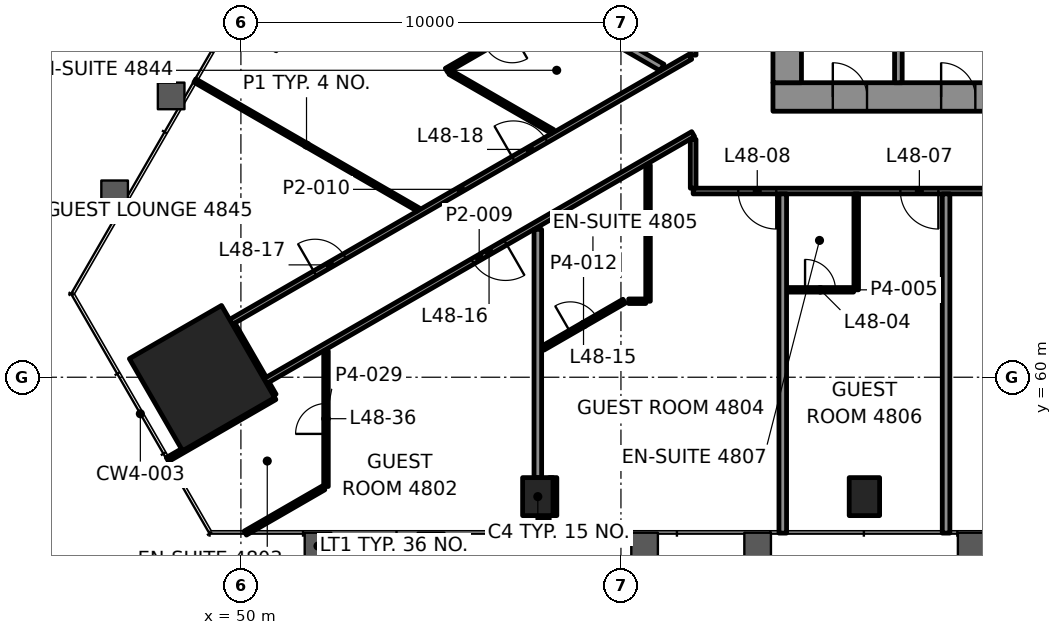
"""IFC4 building model, lengths in metres.
Left out: names, types, materials, properties, quantities, classifications, styles, units other than length and angle.
Written with IfcOpenShell. Run it as: python <this file> out.ifc"""

import sys

from ifc_helpers import new_model, si_unit, direction, frame, frame_2d, origin, origin_2d, place, context, subcontext, project, spatial, rectangle, hollow_rectangle, extrude, element, fill, save


model = new_model("IFC4")
c1 = context("Model", 3, precision=1e-05, world=origin(), true_north=direction((0.0, 1.0)))
c2 = subcontext(c1, "Body", "Model", "MODEL_VIEW")
j1 = project(units=[si_unit("LENGTHUNIT", "METRE"), si_unit("PLANEANGLEUNIT", "RADIAN")], contexts=[c1])
p1 = place(None, origin())
s1 = spatial("IfcSite", under=j1, at=p1, CompositionType="ELEMENT")
p2 = place(p1, origin())
s2 = spatial("IfcBuilding", under=s1, at=p2, CompositionType="ELEMENT")
p3 = place(p2, frame((0.0, 0.0, 206.5)))
s3 = spatial("IfcBuildingStorey", under=s2, at=p3, CompositionType="ELEMENT", Elevation=206.5)
p4 = place(p3, frame((48.978, 59.976, 0.0), z_axis=(0.0, 0.0, 1.0), x_axis=(0.5, -0.866025403784, 0.0)))
e1 = element("IfcColumn", 1, at=p4, inside=s3, PredefinedType="COLUMN", context=c2, shape_type="SweptSolid", body=[
    extrude(rectangle(XDim=2.8, YDim=2.8, at=origin_2d()), origin(), (0.0, 0.0, 1.0), 3.9),
])
for number, where, z_axis, x_axis in (
    (2, (57.812, 56.858, -0.0), (0.0, 0.0, 1.0), (1.0, 0.0, 0.0)),
    (3, (66.406, 56.858, -0.0), (0.0, 0.0, 1.0), (1.0, 0.0, 0.0)),
):
    element("IfcColumn", number, at=place(p3, frame(where, z_axis=z_axis, x_axis=x_axis)), inside=s3, PredefinedType="COLUMN", context=c2, shape_type="SweptSolid", body=[
        extrude(hollow_rectangle(XDim=0.8, YDim=1.0, WallThickness=0.05, at=origin_2d()), origin(), (0.0, 0.0, 1.0), 3.9),
    ])
p5 = place(p3, frame((64.0, 67.375, 0.0), z_axis=(0.0, 0.0, 1.0), x_axis=(1.0, 0.0, 0.0)))
e4 = element("IfcWall", 4, at=p5, inside=s3, PredefinedType="SHEAR", context=c2, shape_type="SweptSolid", body=[
    extrude(rectangle(XDim=22.0, YDim=0.75, at=frame_2d((11.0, 0.0))), origin(), (0.0, 0.0, 1.0), 3.7),
])
p6 = place(p5, frame((1.575, 0.0, 0.0)))
e5 = element("IfcOpeningElement", 5, at=p6, cuts=e4, PredefinedType="OPENING", context=c2, shape_type="SweptSolid", body=[
    extrude(rectangle(XDim=0.9, YDim=2.1, at=frame_2d((0.45, 1.05))), frame((0.0, 0.385, 0.0), z_axis=(0.0, -1.0, 0.0), x_axis=(1.0, 0.0, 0.0)), (0.0, 0.0, 1.0), 0.77),
])
p7 = place(p5, frame((4.425, 0.0, 0.0)))
e6 = element("IfcOpeningElement", 6, at=p7, cuts=e4, PredefinedType="OPENING", context=c2, shape_type="SweptSolid", body=[
    extrude(rectangle(XDim=0.9, YDim=2.1, at=frame_2d((0.45, 1.05))), frame((0.0, 0.385, 0.0), z_axis=(0.0, -1.0, 0.0), x_axis=(1.0, 0.0, 0.0)), (0.0, 0.0, 1.0), 0.77),
])
p8 = place(p3, frame((64.375, 67.75, 0.0), z_axis=(0.0, 0.0, 1.0), x_axis=(0.0, 1.0, 0.0)))
e7 = element("IfcWall", 7, at=p8, inside=s3, PredefinedType="SHEAR", context=c2, shape_type="SweptSolid", body=[
    extrude(rectangle(XDim=14.5, YDim=0.75, at=frame_2d((7.25, 0.0))), origin(), (0.0, 0.0, 1.0), 3.7),
])
p9 = place(p8, frame((4.65, 0.0, 0.0)))
e8 = element("IfcOpeningElement", 8, at=p9, cuts=e7, PredefinedType="OPENING", context=c2, shape_type="SweptSolid", body=[
    extrude(rectangle(XDim=1.8, YDim=2.1, at=frame_2d((0.9, 1.05))), frame((0.0, 0.385, 0.0), z_axis=(0.0, -1.0, 0.0), x_axis=(1.0, 0.0, 0.0)), (0.0, 0.0, 1.0), 0.77),
])
p10 = place(p8, frame((2.55, 0.0, 0.0)))
e9 = element("IfcOpeningElement", 9, at=p10, cuts=e7, PredefinedType="OPENING", context=c2, shape_type="SweptSolid", body=[
    extrude(rectangle(XDim=0.9, YDim=2.1, at=frame_2d((0.45, 1.05))), frame((0.0, 0.385, 0.0), z_axis=(0.0, -1.0, 0.0), x_axis=(1.0, 0.0, 0.0)), (0.0, 0.0, 1.0), 0.77),
])
p11 = place(p8, frame((10.35, 0.0, 0.0)))
e10 = element("IfcOpeningElement", 10, at=p11, cuts=e7, PredefinedType="OPENING", context=c2, shape_type="SweptSolid", body=[
    extrude(rectangle(XDim=0.9, YDim=2.1, at=frame_2d((0.45, 1.05))), frame((0.0, 0.385, 0.0), z_axis=(0.0, -1.0, 0.0), x_axis=(1.0, 0.0, 0.0)), (0.0, 0.0, 1.0), 0.77),
])
p12 = place(p3, frame((57.812, 56.358, 0.0), z_axis=(0.0, 0.0, 1.0), x_axis=(1.0, 0.0, 0.0)))
e11 = element("IfcWall", 11, at=p12, inside=s3, PredefinedType="PARTITIONING", context=c2, shape_type="SweptSolid", body=[
    extrude(rectangle(XDim=0.3, YDim=0.2, at=frame_2d((0.15, 0.0))), origin(), (0.0, 0.0, 1.0), 3.1),
])
p13 = place(p3, frame((60.203, 62.0, 0.0), z_axis=(0.0, 0.0, 1.0), x_axis=(1.0, 0.0, 0.0)))
e12 = element("IfcWall", 12, at=p13, inside=s3, PredefinedType="PARTITIONING", context=c2, shape_type="SweptSolid", body=[
    extrude(rectangle(XDim=0.449, YDim=0.12, at=frame_2d((0.225, 0.0))), origin(), (0.0, 0.0, 1.0), 3.1),
])
p14 = place(p3, frame((64.368, 62.3, 0.0), z_axis=(0.0, 0.0, 1.0), x_axis=(1.0, 0.0, 0.0)))
e13 = element("IfcWall", 13, at=p14, inside=s3, PredefinedType="PARTITIONING", context=c2, shape_type="SweptSolid", body=[
    extrude(rectangle(XDim=1.753, YDim=0.12, at=frame_2d((0.877, 0.0))), origin(), (0.0, 0.0, 1.0), 3.1),
])
p15 = place(p14, frame((0.477, 0.0, 0.0)))
e14 = element("IfcOpeningElement", 14, at=p15, cuts=e13, PredefinedType="OPENING", context=c2, shape_type="SweptSolid", body=[
    extrude(rectangle(XDim=0.8, YDim=2.1, at=frame_2d((0.4, 1.05))), frame((0.0, 0.07, 0.0), z_axis=(0.0, -1.0, 0.0), x_axis=(1.0, 0.0, 0.0)), (0.0, 0.0, 1.0), 0.14),
])
p16 = place(p3, frame((88.1, 64.9, 0.0), z_axis=(0.0, 0.0, 1.0), x_axis=(-1.0, 0.0, 0.0)))
e15 = element("IfcWall", 15, at=p16, inside=s3, PredefinedType="PARTITIONING", context=c2, shape_type="SweptSolid", body=[
    extrude(rectangle(XDim=26.2, YDim=0.15, at=frame_2d((13.1, 0.0))), origin(), (0.0, 0.0, 1.0), 3.1),
])
p17 = place(p16, frame((7.443, 0.0, 0.0)))
e16 = element("IfcOpeningElement", 16, at=p17, cuts=e15, PredefinedType="OPENING", context=c2, shape_type="SweptSolid", body=[
    extrude(rectangle(XDim=1.0, YDim=2.1, at=frame_2d((0.5, 1.05))), frame((0.0, 0.085, 0.0), z_axis=(0.0, -1.0, 0.0), x_axis=(1.0, 0.0, 0.0)), (0.0, 0.0, 1.0), 0.17),
])
p18 = place(p16, frame((16.037, 0.0, 0.0)))
e17 = element("IfcOpeningElement", 17, at=p18, cuts=e15, PredefinedType="OPENING", context=c2, shape_type="SweptSolid", body=[
    extrude(rectangle(XDim=1.0, YDim=2.1, at=frame_2d((0.5, 1.05))), frame((0.0, 0.085, 0.0), z_axis=(0.0, -1.0, 0.0), x_axis=(1.0, 0.0, 0.0)), (0.0, 0.0, 1.0), 0.17),
])
p19 = place(p16, frame((19.747, 0.0, 0.0)))
e18 = element("IfcOpeningElement", 18, at=p19, cuts=e15, PredefinedType="OPENING", context=c2, shape_type="SweptSolid", body=[
    extrude(rectangle(XDim=1.0, YDim=2.1, at=frame_2d((0.5, 1.05))), frame((0.0, 0.085, 0.0), z_axis=(0.0, -1.0, 0.0), x_axis=(1.0, 0.0, 0.0)), (0.0, 0.0, 1.0), 0.17),
])
p20 = place(p16, frame((24.013, 0.0, 0.0)))
e19 = element("IfcOpeningElement", 19, at=p20, cuts=e15, PredefinedType="OPENING", context=c2, shape_type="SweptSolid", body=[
    extrude(rectangle(XDim=1.0, YDim=2.1, at=frame_2d((0.5, 1.05))), frame((0.0, 0.085, 0.0), z_axis=(0.0, -1.0, 0.0), x_axis=(1.0, 0.0, 0.0)), (0.0, 0.0, 1.0), 0.17),
])
p21 = place(p3, frame((50.115, 55.898, 0.0), z_axis=(0.0, 0.0, 1.0), x_axis=(0.865977459579, 0.500083032607, 0.0)))
e20 = element("IfcWall", 20, at=p21, inside=s3, PredefinedType="PARTITIONING", context=c2, shape_type="SweptSolid", body=[
    extrude(rectangle(XDim=2.383, YDim=0.12, at=frame_2d((1.192, 0.0))), origin(), (0.0, 0.0, 1.0), 3.1),
])
p22 = place(p3, frame((57.947, 60.767, 0.0), z_axis=(0.0, 0.0, 1.0), x_axis=(0.866060325455, 0.499939509014, 0.0)))
e21 = element("IfcWall", 21, at=p22, inside=s3, PredefinedType="PARTITIONING", context=c2, shape_type="SweptSolid", body=[
    extrude(rectangle(XDim=2.467, YDim=0.12, at=frame_2d((1.233, 0.0))), origin(), (0.0, 0.0, 1.0), 3.1),
])
p23 = place(p22, frame((0.833, 0.0, 0.0)))
e22 = element("IfcOpeningElement", 22, at=p23, cuts=e21, PredefinedType="OPENING", context=c2, shape_type="SweptSolid", body=[
    extrude(rectangle(XDim=0.8, YDim=2.1, at=frame_2d((0.4, 1.05))), frame((0.0, 0.07, 0.0), z_axis=(0.0, -1.0, 0.0), x_axis=(1.0, 0.0, 0.0)), (0.0, 0.0, 1.0), 0.14),
])
p24 = place(p3, frame((48.067, 57.834, 0.0), z_axis=(0.0, 0.0, 1.0), x_axis=(0.866035906198, 0.499981808845, 0.0)))
e23 = element("IfcWall", 23, at=p24, inside=s3, PredefinedType="PARTITIONING", context=c2, shape_type="SweptSolid", body=[
    extrude(rectangle(XDim=3.259, YDim=0.12, at=frame_2d((1.63, 0.0))), origin(), (0.0, 0.0, 1.0), 3.1),
])
p25 = place(p3, frame((61.9, 66.397, 0.0), z_axis=(0.0, 0.0, 1.0), x_axis=(-0.866028610752, -0.499994445327, 0.0)))
e24 = element("IfcWall", 24, at=p25, inside=s3, PredefinedType="PARTITIONING", context=c2, shape_type="SweptSolid", body=[
    extrude(rectangle(XDim=13.002, YDim=0.15, at=frame_2d((6.501, 0.0))), origin(), (0.0, 0.0, 1.0), 2.947),
])
p26 = place(p25, frame((5.701, 0.0, 0.0)))
e25 = element("IfcOpeningElement", 25, at=p26, cuts=e24, PredefinedType="OPENING", context=c2, shape_type="SweptSolid", body=[
    extrude(rectangle(XDim=1.0, YDim=2.1, at=frame_2d((0.5, 1.05))), frame((0.0, 0.085, 0.0), z_axis=(0.0, -1.0, 0.0), x_axis=(1.0, 0.0, 0.0)), (0.0, 0.0, 1.0), 0.17),
])
p27 = place(p3, frame((49.74, 61.456, 0.0), z_axis=(0.0, 0.0, 1.0), x_axis=(0.866030582951, 0.499991029314, 0.0)))
e26 = element("IfcWall", 26, at=p27, inside=s3, PredefinedType="PARTITIONING", context=c2, shape_type="SweptSolid", body=[
    extrude(rectangle(XDim=13.954, YDim=0.15, at=frame_2d((6.977, 0.0))), origin(), (0.0, 0.0, 1.0), 3.1),
])
p28 = place(p27, frame((2.552, 0.0, 0.0)))
e27 = element("IfcOpeningElement", 27, at=p28, cuts=e26, PredefinedType="OPENING", context=c2, shape_type="SweptSolid", body=[
    extrude(rectangle(XDim=0.9, YDim=2.1, at=frame_2d((0.45, 1.05))), frame((0.0, 0.085, 0.0), z_axis=(0.0, -1.0, 0.0), x_axis=(1.0, 0.0, 0.0)), (0.0, 0.0, 1.0), 0.17),
])
p29 = place(p27, frame((8.579, 0.0, 0.0)))
e28 = element("IfcOpeningElement", 28, at=p29, cuts=e26, PredefinedType="OPENING", context=c2, shape_type="SweptSolid", body=[
    extrude(rectangle(XDim=1.0, YDim=2.1, at=frame_2d((0.5, 1.05))), frame((0.0, 0.085, 0.0), z_axis=(0.0, -1.0, 0.0), x_axis=(1.0, 0.0, 0.0)), (0.0, 0.0, 1.0), 0.17),
])
p30 = place(p3, frame((58.175, 69.674, 0.0), z_axis=(0.0, 0.0, 1.0), x_axis=(-0.866051923801, -0.49995406317, 0.0)))
e29 = element("IfcWall", 29, at=p30, inside=s3, PredefinedType="PARTITIONING", context=c2, shape_type="SweptSolid", body=[
    extrude(rectangle(XDim=3.194, YDim=0.12, at=frame_2d((1.597, 0.0))), origin(), (0.0, 0.0, 1.0), 3.1),
])
p31 = place(p30, frame((1.197, 0.0, 0.0)))
e30 = element("IfcOpeningElement", 30, at=p31, cuts=e29, PredefinedType="OPENING", context=c2, shape_type="SweptSolid", body=[
    extrude(rectangle(XDim=0.8, YDim=2.1, at=frame_2d((0.4, 1.05))), frame((0.0, 0.07, 0.0), z_axis=(0.0, -1.0, 0.0), x_axis=(1.0, 0.0, 0.0)), (0.0, 0.0, 1.0), 0.14),
])
p32 = place(p3, frame((68.555, 55.898, 0.0), z_axis=(0.0, 0.0, 1.0), x_axis=(0.0, 1.0, 0.0)))
e31 = element("IfcWall", 31, at=p32, inside=s3, PredefinedType="PARTITIONING", context=c2, shape_type="SweptSolid", body=[
    extrude(rectangle(XDim=8.927, YDim=0.2, at=frame_2d((4.463, 0.0))), origin(), (0.0, 0.0, 1.0), 3.022),
])
p33 = place(p3, frame((66.191, 62.3, 0.0), z_axis=(0.0, 0.0, 1.0), x_axis=(0.0, 1.0, 0.0)))
e32 = element("IfcWall", 32, at=p33, inside=s3, PredefinedType="PARTITIONING", context=c2, shape_type="SweptSolid", body=[
    extrude(rectangle(XDim=2.525, YDim=0.12, at=frame_2d((1.262, 0.0))), origin(), (0.0, 0.0, 1.0), 3.1),
])
p34 = place(p3, frame((64.258, 55.898, 0.0), z_axis=(0.0, 0.0, 1.0), x_axis=(0.0, 1.0, 0.0)))
e33 = element("IfcWall", 33, at=p34, inside=s3, PredefinedType="PARTITIONING", context=c2, shape_type="SweptSolid", body=[
    extrude(rectangle(XDim=8.927, YDim=0.2, at=frame_2d((4.463, 0.0))), origin(), (0.0, 0.0, 1.0), 3.022),
])
p35 = place(p3, frame((61.9, 64.975, 0.0), z_axis=(0.0, 0.0, 1.0), x_axis=(0.0, 1.0, 0.0)))
e34 = element("IfcWall", 34, at=p35, inside=s3, PredefinedType="PARTITIONING", context=c2, shape_type="SweptSolid", body=[
    extrude(rectangle(XDim=1.286, YDim=0.15, at=frame_2d((0.643, 0.0))), origin(), (0.0, 0.0, 1.0), 2.947),
])
p36 = place(p3, frame((61.9, 68.476, 0.0), z_axis=(0.0, 0.0, 1.0), x_axis=(0.0, 1.0, 0.0)))
e35 = element("IfcWall", 35, at=p36, inside=s3, PredefinedType="PARTITIONING", context=c2, shape_type="SweptSolid", body=[
    extrude(rectangle(XDim=16.624, YDim=0.15, at=frame_2d((8.312, 0.0))), origin(), (0.0, 0.0, 1.0), 3.1),
])
p37 = place(p36, frame((1.984, 0.0, 0.0)))
e36 = element("IfcOpeningElement", 36, at=p37, cuts=e35, PredefinedType="OPENING", context=c2, shape_type="SweptSolid", body=[
    extrude(rectangle(XDim=1.0, YDim=2.1, at=frame_2d((0.5, 1.05))), frame((0.0, 0.085, 0.0), z_axis=(0.0, -1.0, 0.0), x_axis=(1.0, 0.0, 0.0)), (0.0, 0.0, 1.0), 0.17),
])
p38 = place(p36, frame((10.437, 0.0, 0.0)))
e37 = element("IfcOpeningElement", 37, at=p38, cuts=e35, PredefinedType="OPENING", context=c2, shape_type="SweptSolid", body=[
    extrude(rectangle(XDim=1.0, YDim=2.1, at=frame_2d((0.5, 1.05))), frame((0.0, 0.085, 0.0), z_axis=(0.0, -1.0, 0.0), x_axis=(1.0, 0.0, 0.0)), (0.0, 0.0, 1.0), 0.17),
])
p39 = place(p3, frame((60.713, 62.0, 0.0), z_axis=(0.0, 0.0, 1.0), x_axis=(0.0, 1.0, 0.0)))
e38 = element("IfcWall", 38, at=p39, inside=s3, PredefinedType="PARTITIONING", context=c2, shape_type="SweptSolid", body=[
    extrude(rectangle(XDim=3.585, YDim=0.12, at=frame_2d((1.793, 0.0))), origin(), (0.0, 0.0, 1.0), 2.947),
])
p40 = place(p3, frame((58.213, 56.358, 0.0), z_axis=(0.0, 0.0, 1.0), x_axis=(0.0, 1.0, 0.0)))
e39 = element("IfcWall", 39, at=p40, inside=s3, PredefinedType="PARTITIONING", context=c2, shape_type="SweptSolid", body=[
    extrude(rectangle(XDim=1.0, YDim=0.2, at=frame_2d((0.5, 0.0))), origin(), (0.0, 0.0, 1.0), 3.022),
])
p41 = place(p3, frame((57.813, 57.358, 0.0), z_axis=(0.0, 0.0, 1.0), x_axis=(0.0, 1.0, 0.0)))
e40 = element("IfcWall", 40, at=p41, inside=s3, PredefinedType="PARTITIONING", context=c2, shape_type="SweptSolid", body=[
    extrude(rectangle(XDim=6.532, YDim=0.2, at=frame_2d((3.266, 0.0))), origin(), (0.0, 0.0, 1.0), 3.1),
])
p42 = place(p3, frame((52.239, 57.125, 0.0), z_axis=(0.0, 0.0, 1.0), x_axis=(0.0, 1.0, 0.0)))
e41 = element("IfcWall", 41, at=p42, inside=s3, PredefinedType="PARTITIONING", context=c2, shape_type="SweptSolid", body=[
    extrude(rectangle(XDim=3.569, YDim=0.12, at=frame_2d((1.784, 0.0))), origin(), (0.0, 0.0, 1.0), 3.1),
])
p43 = place(p42, frame((1.384, 0.0, 0.0)))
e42 = element("IfcOpeningElement", 42, at=p43, cuts=e41, PredefinedType="OPENING", context=c2, shape_type="SweptSolid", body=[
    extrude(rectangle(XDim=0.8, YDim=2.1, at=frame_2d((0.4, 1.05))), frame((0.0, 0.07, 0.0), z_axis=(0.0, -1.0, 0.0), x_axis=(1.0, 0.0, 0.0)), (0.0, 0.0, 1.0), 0.14),
])
p44 = place(p3, frame((50.86, 59.516, 0.0), z_axis=(0.0, 0.0, 1.0), x_axis=(-0.499741784413, 0.866174433305, 0.0)))
e43 = element("IfcWall", 43, at=p44, inside=s3, PredefinedType="PARTITIONING", context=c2, shape_type="SweptSolid", body=[
    extrude(rectangle(XDim=0.365, YDim=0.15, at=frame_2d((0.182, 0.0))), origin(), (0.0, 0.0, 1.0), 3.1),
])
p45 = place(p3, frame((61.082, 68.15, 0.0), z_axis=(0.0, 0.0, 1.0), x_axis=(-0.866022549299, 0.50000494408, 0.0)))
e44 = element("IfcWall", 44, at=p45, inside=s3, PredefinedType="PARTITIONING", context=c2, shape_type="SweptSolid", body=[
    extrude(rectangle(XDim=10.474, YDim=0.2, at=frame_2d((5.237, 0.0))), origin(), (0.0, 0.0, 1.0), 3.022),
])
p46 = place(p3, frame((58.199, 66.466, 0.0), z_axis=(0.0, 0.0, 1.0), x_axis=(-0.866028856698, 0.499994019331, 0.0)))
e45 = element("IfcWall", 45, at=p46, inside=s3, PredefinedType="PARTITIONING", context=c2, shape_type="SweptSolid", body=[
    extrude(rectangle(XDim=3.113, YDim=0.12, at=frame_2d((1.556, 0.0))), origin(), (0.0, 0.0, 1.0), 3.1),
])
p47 = place(p3, frame((54.663, 64.414, 0.0), z_axis=(0.0, 0.0, 1.0), x_axis=(-0.866023732449, 0.500002894826, 0.0)))
e46 = element("IfcWall", 46, at=p47, inside=s3, PredefinedType="PARTITIONING", context=c2, shape_type="SweptSolid", body=[
    extrude(rectangle(XDim=6.782, YDim=0.1, at=frame_2d((3.391, 0.0))), origin(), (0.0, 0.0, 1.0), 3.1),
])
p48 = place(p3, frame((50.603, 59.962, 0.0), z_axis=(0.0, 0.0, 1.0), x_axis=(-0.499991515992, 0.866030301974, 0.0)))
e47 = element("IfcWall", 47, at=p48, inside=s3, PredefinedType="PARTITIONING", context=c2, shape_type="SweptSolid", body=[
    extrude(rectangle(XDim=1.649, YDim=0.15, at=frame_2d((0.825, 0.0))), origin(), (0.0, 0.0, 1.0), 2.947),
])
p49 = place(p3, frame((67.3, 67.75, 0.0), z_axis=(0.0, 0.0, 1.0), x_axis=(0.0, 1.0, 0.0)))
e48 = element("IfcWall", 48, at=p49, inside=s3, PredefinedType="PARTITIONING", context=c2, shape_type="SweptSolid", body=[
    extrude(rectangle(XDim=3.9, YDim=0.2, at=frame_2d((1.95, 0.0))), origin(), (0.0, 0.0, 1.0), 3.7),
])
p50 = place(p15, origin())
e49 = element("IfcDoor", 49, at=p50, inside=s3, OperationType="SINGLE_SWING_RIGHT", PredefinedType="DOOR", context=c2, shape_type="SweptSolid", body=[
    extrude(rectangle(XDim=0.8, YDim=2.1, at=frame_2d((0.4, 1.05))), frame((0.0, 0.025, 0.0), z_axis=(0.0, -1.0, 0.0), x_axis=(1.0, 0.0, 0.0)), (0.0, 0.0, 1.0), 0.05),
])
fill(e14, e49)
p51 = place(p19, origin())
e50 = element("IfcDoor", 50, at=p51, inside=s3, OperationType="SINGLE_SWING_RIGHT", PredefinedType="DOOR", context=c2, shape_type="SweptSolid", body=[
    extrude(rectangle(XDim=1.0, YDim=2.1, at=frame_2d((0.5, 1.05))), frame((0.0, 0.025, 0.0), z_axis=(0.0, -1.0, 0.0), x_axis=(1.0, 0.0, 0.0)), (0.0, 0.0, 1.0), 0.05),
])
fill(e18, e50)
p52 = place(p20, origin())
e51 = element("IfcDoor", 51, at=p52, inside=s3, OperationType="SINGLE_SWING_RIGHT", PredefinedType="DOOR", context=c2, shape_type="SweptSolid", body=[
    extrude(rectangle(XDim=1.0, YDim=2.1, at=frame_2d((0.5, 1.05))), frame((0.0, 0.025, 0.0), z_axis=(0.0, -1.0, 0.0), x_axis=(1.0, 0.0, 0.0)), (0.0, 0.0, 1.0), 0.05),
])
fill(e19, e51)
p53 = place(p23, origin())
e52 = element("IfcDoor", 52, at=p53, inside=s3, OperationType="SINGLE_SWING_RIGHT", PredefinedType="DOOR", context=c2, shape_type="SweptSolid", body=[
    extrude(rectangle(XDim=0.8, YDim=2.1, at=frame_2d((0.4, 1.05))), frame((0.0, 0.025, 0.0), z_axis=(0.0, -1.0, 0.0), x_axis=(1.0, 0.0, 0.0)), (0.0, 0.0, 1.0), 0.05),
])
fill(e22, e52)
p54 = place(p26, origin())
e53 = element("IfcDoor", 53, at=p54, inside=s3, OperationType="SINGLE_SWING_RIGHT", PredefinedType="DOOR", context=c2, shape_type="SweptSolid", body=[
    extrude(rectangle(XDim=1.0, YDim=2.1, at=frame_2d((0.5, 1.05))), frame((0.0, 0.025, 0.0), z_axis=(0.0, -1.0, 0.0), x_axis=(1.0, 0.0, 0.0)), (0.0, 0.0, 1.0), 0.05),
])
fill(e25, e53)
p55 = place(p28, origin())
e54 = element("IfcDoor", 54, at=p55, inside=s3, OperationType="SINGLE_SWING_RIGHT", PredefinedType="DOOR", context=c2, shape_type="SweptSolid", body=[
    extrude(rectangle(XDim=0.9, YDim=2.1, at=frame_2d((0.45, 1.05))), frame((0.0, 0.025, 0.0), z_axis=(0.0, -1.0, 0.0), x_axis=(1.0, 0.0, 0.0)), (0.0, 0.0, 1.0), 0.05),
])
fill(e27, e54)
p56 = place(p29, origin())
e55 = element("IfcDoor", 55, at=p56, inside=s3, OperationType="SINGLE_SWING_RIGHT", PredefinedType="DOOR", context=c2, shape_type="SweptSolid", body=[
    extrude(rectangle(XDim=1.0, YDim=2.1, at=frame_2d((0.5, 1.05))), frame((0.0, 0.025, 0.0), z_axis=(0.0, -1.0, 0.0), x_axis=(1.0, 0.0, 0.0)), (0.0, 0.0, 1.0), 0.05),
])
fill(e28, e55)
p57 = place(p43, origin())
e56 = element("IfcDoor", 56, at=p57, inside=s3, OperationType="SINGLE_SWING_RIGHT", PredefinedType="DOOR", context=c2, shape_type="SweptSolid", body=[
    extrude(rectangle(XDim=0.8, YDim=2.1, at=frame_2d((0.4, 1.05))), frame((0.0, 0.025, 0.0), z_axis=(0.0, -1.0, 0.0), x_axis=(1.0, 0.0, 0.0)), (0.0, 0.0, 1.0), 0.05),
])
fill(e42, e56)
p58 = place(p6, origin())
e57 = element("IfcDoor", 57, at=p58, inside=s3, OperationType="SINGLE_SWING_LEFT", PredefinedType="DOOR", context=c2, shape_type="SweptSolid", body=[
    extrude(rectangle(XDim=0.9, YDim=2.1, at=frame_2d((0.45, 1.05))), frame((0.0, 0.095, 0.0), z_axis=(0.0, -1.0, 0.0), x_axis=(1.0, 0.0, 0.0)), (0.0, 0.0, 1.0), 0.19),
])
fill(e5, e57)
p59 = place(p7, origin())
e58 = element("IfcDoor", 58, at=p59, inside=s3, OperationType="SINGLE_SWING_LEFT", PredefinedType="DOOR", context=c2, shape_type="SweptSolid", body=[
    extrude(rectangle(XDim=0.9, YDim=2.1, at=frame_2d((0.45, 1.05))), frame((0.0, 0.095, 0.0), z_axis=(0.0, -1.0, 0.0), x_axis=(1.0, 0.0, 0.0)), (0.0, 0.0, 1.0), 0.19),
])
fill(e6, e58)
save(model, sys.argv[1])
